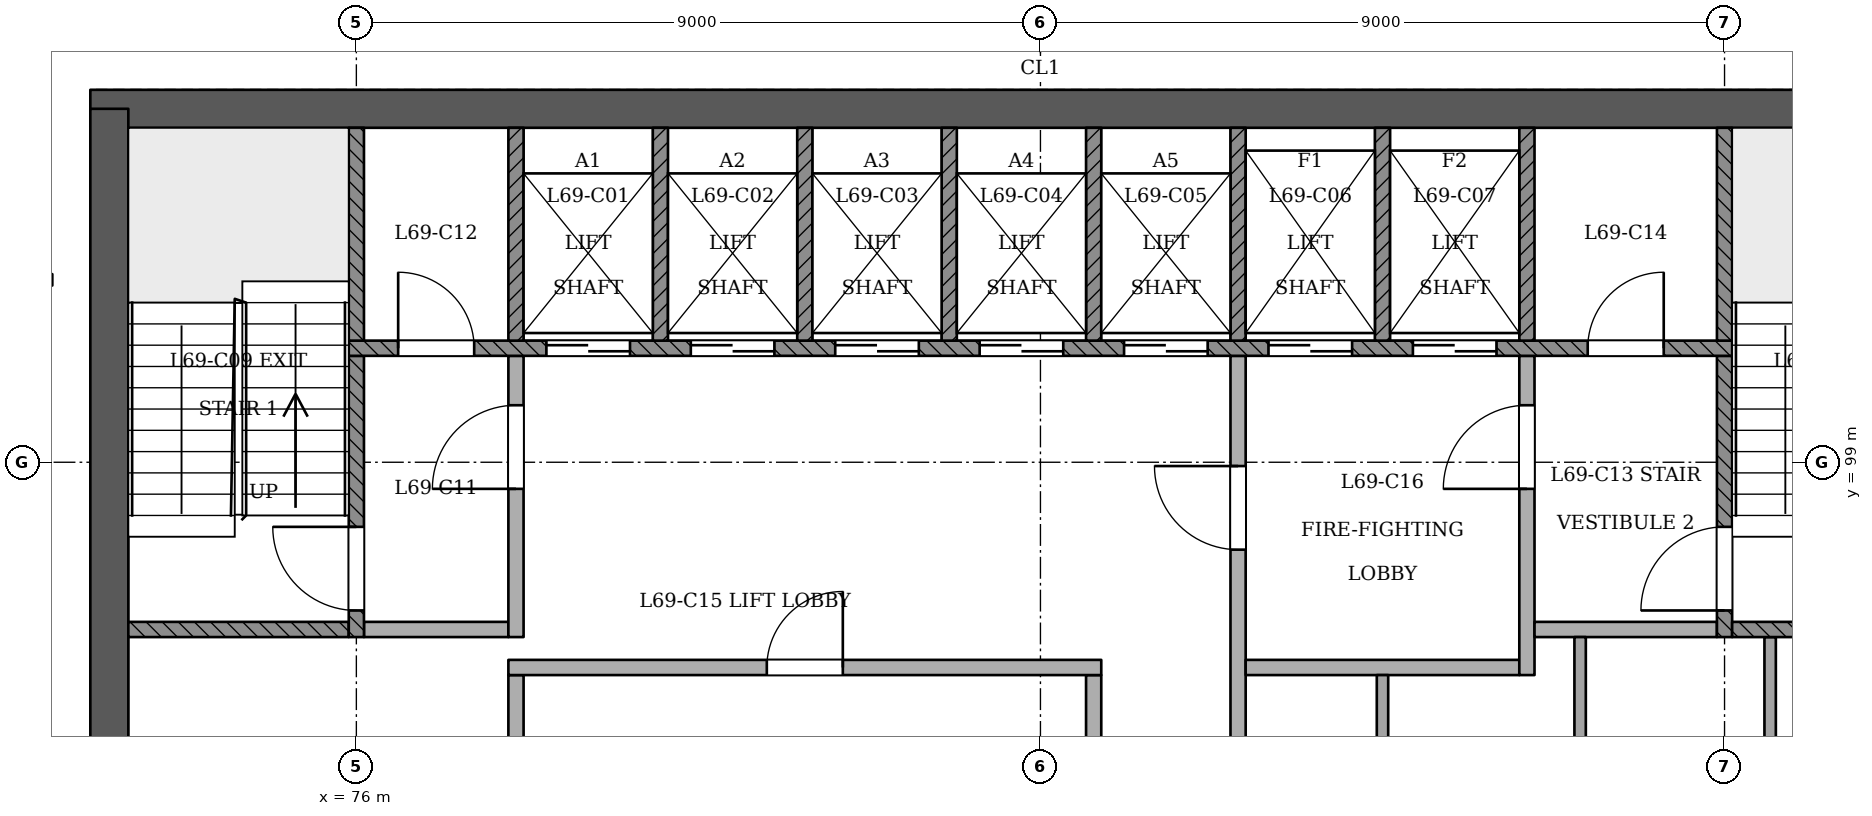
"""IFC4 building model, lengths in metres.
Left out: names, types, materials, properties, quantities, classifications, styles, units other than length and angle.
Written with IfcOpenShell. Run it as: python <this file> out.ifc"""

import sys

from ifc_helpers import new_model, si_unit, direction, frame, frame_2d, origin, place, context, subcontext, project, spatial, rectangle, extrude, element, fill, save


model = new_model("IFC4")
c1 = context("Model", 3, precision=1e-05, world=origin(), true_north=direction((0.0, 1.0)))
c2 = subcontext(c1, "Body", "Model", "MODEL_VIEW")
j1 = project(units=[si_unit("LENGTHUNIT", "METRE"), si_unit("PLANEANGLEUNIT", "RADIAN")], contexts=[c1])
p1 = place(None, origin())
s1 = spatial("IfcSite", under=j1, at=p1, CompositionType="ELEMENT")
p2 = place(p1, origin())
s2 = spatial("IfcBuilding", under=s1, at=p2, CompositionType="ELEMENT")
p3 = place(p2, frame((0.0, 0.0, 268.0)))
s3 = spatial("IfcBuildingStorey", under=s2, at=p3, CompositionType="ELEMENT", Elevation=268.0)
p4 = place(p3, frame((97.25, 103.65, 0.0), z_axis=(0.0, 0.0, 1.0), x_axis=(-1.0, 0.0, 0.0)))
e1 = element("IfcWall", 1, at=p4, inside=s3, PredefinedType="SHEAR", context=c2, shape_type="SweptSolid", body=[
    extrude(rectangle(XDim=24.75, YDim=0.5, at=frame_2d((12.375, 0.0))), origin(), (0.0, 0.0, 1.0), 3.6),
])
p5 = place(p3, frame((72.75, 103.65, 0.0), z_axis=(0.0, 0.0, 1.0), x_axis=(0.0, -1.0, 0.0)))
e2 = element("IfcWall", 2, at=p5, inside=s3, PredefinedType="SHEAR", context=c2, shape_type="SweptSolid", body=[
    extrude(rectangle(XDim=10.75, YDim=0.5, at=frame_2d((5.375, 0.0))), origin(), (0.0, 0.0, 1.0), 3.6),
])
p6 = place(p3, frame((72.0, 101.4, 0.0), z_axis=(0.0, 0.0, 1.0), x_axis=(-1.0, 0.0, 0.0)))
e3 = element("IfcWall", 3, at=p6, inside=s3, PredefinedType="PARTITIONING", context=c2, shape_type="SweptSolid", body=[
    extrude(rectangle(XDim=1.8, YDim=0.15, at=frame_2d((0.9, 0.0))), origin(), (0.0, 0.0, 1.0), 3.2),
])
for number, where, z_axis, x_axis in (
    (4, (78.1, 93.4, 0.0), (0.0, 0.0, 1.0), (0.0, 1.0, 0.0)),
    (5, (85.7, 93.4, 0.0), (0.0, 0.0, 1.0), (0.0, 1.0, 0.0)),
):
    element("IfcWall", number, at=place(p3, frame(where, z_axis=z_axis, x_axis=x_axis)), inside=s3, PredefinedType="PARTITIONING", context=c2, shape_type="SweptSolid", body=[
        extrude(rectangle(XDim=2.8, YDim=0.2, at=frame_2d((1.4, 0.0))), origin(), (0.0, 0.0, 1.0), 3.2),
    ])
p7 = place(p3, frame((87.6, 93.4, 0.0), z_axis=(0.0, 0.0, 1.0), x_axis=(0.0, 1.0, 0.0)))
e6 = element("IfcWall", 6, at=p7, inside=s3, PredefinedType="PARTITIONING", context=c2, shape_type="SweptSolid", body=[
    extrude(rectangle(XDim=7.0, YDim=0.2, at=frame_2d((3.5, 0.0))), origin(), (0.0, 0.0, 1.0), 3.2),
])
p8 = place(p7, frame((4.45, 0.0, 0.0)))
e7 = element("IfcOpeningElement", 7, at=p8, cuts=e6, PredefinedType="OPENING", context=c2, shape_type="SweptSolid", body=[
    extrude(rectangle(XDim=1.1, YDim=2.1, at=frame_2d((0.55, 1.05))), frame((0.0, 0.11, 0.0), z_axis=(0.0, -1.0, 0.0), x_axis=(1.0, 0.0, 0.0)), (0.0, 0.0, 1.0), 0.221),
])
p9 = place(p3, frame((89.5, 93.4, 0.0), z_axis=(0.0, 0.0, 1.0), x_axis=(0.0, 1.0, 0.0)))
e8 = element("IfcWall", 8, at=p9, inside=s3, PredefinedType="PARTITIONING", context=c2, shape_type="SweptSolid", body=[
    extrude(rectangle(XDim=2.8, YDim=0.15, at=frame_2d((1.4, 0.0))), origin(), (0.0, 0.0, 1.0), 3.2),
])
for number, where, z_axis, x_axis in (
    (9, (92.1, 93.4, 0.0), (0.0, 0.0, 1.0), (0.0, 1.0, 0.0)),
    (10, (94.6, 93.4, 0.0), (0.0, 0.0, 1.0), (0.0, 1.0, 0.0)),
):
    element("IfcWall", number, at=place(p3, frame(where, z_axis=z_axis, x_axis=x_axis)), inside=s3, PredefinedType="PARTITIONING", context=c2, shape_type="SweptSolid", body=[
        extrude(rectangle(XDim=3.3, YDim=0.15, at=frame_2d((1.65, 0.0))), origin(), (0.0, 0.0, 1.0), 3.2),
    ])
p10 = place(p3, frame((78.0, 96.3, 0.0), z_axis=(0.0, 0.0, 1.0), x_axis=(1.0, 0.0, 0.0)))
e11 = element("IfcWall", 11, at=p10, inside=s3, PredefinedType="PARTITIONING", context=c2, shape_type="SweptSolid", body=[
    extrude(rectangle(XDim=7.8, YDim=0.2, at=frame_2d((3.9, 0.0))), origin(), (0.0, 0.0, 1.0), 3.2),
])
p11 = place(p10, frame((3.4, 0.0, 0.0)))
e12 = element("IfcOpeningElement", 12, at=p11, cuts=e11, PredefinedType="OPENING", context=c2, shape_type="SweptSolid", body=[
    extrude(rectangle(XDim=1.0, YDim=2.1, at=frame_2d((0.5, 1.05))), frame((0.0, 0.11, 0.0), z_axis=(0.0, -1.0, 0.0), x_axis=(1.0, 0.0, 0.0)), (0.0, 0.0, 1.0), 0.221),
])
p12 = place(p3, frame((87.7, 96.3, 0.0), z_axis=(0.0, 0.0, 1.0), x_axis=(1.0, 0.0, 0.0)))
e13 = element("IfcWall", 13, at=p12, inside=s3, PredefinedType="PARTITIONING", context=c2, shape_type="SweptSolid", body=[
    extrude(rectangle(XDim=3.6, YDim=0.2, at=frame_2d((1.8, 0.0))), origin(), (0.0, 0.0, 1.0), 3.2),
])
p13 = place(p3, frame((91.4, 96.2, 0.0), z_axis=(0.0, 0.0, 1.0), x_axis=(0.0, 1.0, 0.0)))
e14 = element("IfcWall", 14, at=p13, inside=s3, PredefinedType="PARTITIONING", context=c2, shape_type="SweptSolid", body=[
    extrude(rectangle(XDim=4.2, YDim=0.2, at=frame_2d((2.1, 0.0))), origin(), (0.0, 0.0, 1.0), 3.2),
])
p14 = place(p13, frame((2.45, 0.0, 0.0)))
e15 = element("IfcOpeningElement", 15, at=p14, cuts=e14, PredefinedType="OPENING", context=c2, shape_type="SweptSolid", body=[
    extrude(rectangle(XDim=1.1, YDim=2.1, at=frame_2d((0.55, 1.05))), frame((0.0, 0.11, 0.0), z_axis=(0.0, -1.0, 0.0), x_axis=(1.0, 0.0, 0.0)), (0.0, 0.0, 1.0), 0.221),
])
p15 = place(p3, frame((73.0, 96.8, 0.0), z_axis=(0.0, 0.0, 1.0), x_axis=(1.0, 0.0, 0.0)))
e16 = element("IfcWall", 16, at=p15, inside=s3, PredefinedType="SOLIDWALL", context=c2, shape_type="SweptSolid", body=[
    extrude(rectangle(XDim=2.9, YDim=0.2, at=frame_2d((1.45, 0.0))), origin(), (0.0, 0.0, 1.0), 3.2),
])
p16 = place(p3, frame((76.0, 96.7, 0.0), z_axis=(0.0, 0.0, 1.0), x_axis=(0.0, 1.0, 0.0)))
e17 = element("IfcWall", 17, at=p16, inside=s3, PredefinedType="SOLIDWALL", context=c2, shape_type="SweptSolid", body=[
    extrude(rectangle(XDim=3.7, YDim=0.2, at=frame_2d((1.85, 0.0))), origin(), (0.0, 0.0, 1.0), 3.2),
])
p17 = place(p16, frame((0.35, 0.0, 0.0)))
e18 = element("IfcOpeningElement", 18, at=p17, cuts=e17, PredefinedType="OPENING", context=c2, shape_type="SweptSolid", body=[
    extrude(rectangle(XDim=1.1, YDim=2.1, at=frame_2d((0.55, 1.05))), frame((0.0, 0.11, 0.0), z_axis=(0.0, -1.0, 0.0), x_axis=(1.0, 0.0, 0.0)), (0.0, 0.0, 1.0), 0.221),
])
p18 = place(p3, frame((76.1, 96.8, 0.0), z_axis=(0.0, 0.0, 1.0), x_axis=(1.0, 0.0, 0.0)))
e19 = element("IfcWall", 19, at=p18, inside=s3, PredefinedType="PARTITIONING", context=c2, shape_type="SweptSolid", body=[
    extrude(rectangle(XDim=1.9, YDim=0.2, at=frame_2d((0.95, 0.0))), origin(), (0.0, 0.0, 1.0), 3.2),
])
p19 = place(p3, frame((78.1, 96.7, 0.0), z_axis=(0.0, 0.0, 1.0), x_axis=(0.0, 1.0, 0.0)))
e20 = element("IfcWall", 20, at=p19, inside=s3, PredefinedType="PARTITIONING", context=c2, shape_type="SweptSolid", body=[
    extrude(rectangle(XDim=3.7, YDim=0.2, at=frame_2d((1.85, 0.0))), origin(), (0.0, 0.0, 1.0), 3.2),
])
p20 = place(p19, frame((1.95, 0.0, 0.0)))
e21 = element("IfcOpeningElement", 21, at=p20, cuts=e20, PredefinedType="OPENING", context=c2, shape_type="SweptSolid", body=[
    extrude(rectangle(XDim=1.1, YDim=2.1, at=frame_2d((0.55, 1.05))), frame((0.0, 0.11, 0.0), z_axis=(0.0, -1.0, 0.0), x_axis=(1.0, 0.0, 0.0)), (0.0, 0.0, 1.0), 0.221),
])
p21 = place(p3, frame((91.5, 96.8, 0.0), z_axis=(0.0, 0.0, 1.0), x_axis=(1.0, 0.0, 0.0)))
e22 = element("IfcWall", 22, at=p21, inside=s3, PredefinedType="PARTITIONING", context=c2, shape_type="SweptSolid", body=[
    extrude(rectangle(XDim=2.4, YDim=0.2, at=frame_2d((1.2, 0.0))), origin(), (0.0, 0.0, 1.0), 3.2),
])
p22 = place(p3, frame((94.0, 96.7, 0.0), z_axis=(0.0, 0.0, 1.0), x_axis=(0.0, 1.0, 0.0)))
e23 = element("IfcWall", 23, at=p22, inside=s3, PredefinedType="SOLIDWALL", context=c2, shape_type="SweptSolid", body=[
    extrude(rectangle(XDim=3.7, YDim=0.2, at=frame_2d((1.85, 0.0))), origin(), (0.0, 0.0, 1.0), 3.2),
])
p23 = place(p22, frame((0.35, 0.0, 0.0)))
e24 = element("IfcOpeningElement", 24, at=p23, cuts=e23, PredefinedType="OPENING", context=c2, shape_type="SweptSolid", body=[
    extrude(rectangle(XDim=1.1, YDim=2.1, at=frame_2d((0.55, 1.05))), frame((0.0, 0.11, 0.0), z_axis=(0.0, -1.0, 0.0), x_axis=(1.0, 0.0, 0.0)), (0.0, 0.0, 1.0), 0.221),
])
p24 = place(p3, frame((94.1, 96.8, 0.0), z_axis=(0.0, 0.0, 1.0), x_axis=(1.0, 0.0, 0.0)))
e25 = element("IfcWall", 25, at=p24, inside=s3, PredefinedType="SOLIDWALL", context=c2, shape_type="SweptSolid", body=[
    extrude(rectangle(XDim=2.9, YDim=0.2, at=frame_2d((1.45, 0.0))), origin(), (0.0, 0.0, 1.0), 3.2),
])
p25 = place(p3, frame((75.9, 100.5, 0.0), z_axis=(0.0, 0.0, 1.0), x_axis=(1.0, 0.0, 0.0)))
e26 = element("IfcWall", 26, at=p25, inside=s3, PredefinedType="SOLIDWALL", context=c2, shape_type="SweptSolid", body=[
    extrude(rectangle(XDim=18.2, YDim=0.2, at=frame_2d((9.1, 0.0))), origin(), (0.0, 0.0, 1.0), 3.2),
])
p26 = place(p25, frame((2.6, 0.0, 0.0)))
e27 = element("IfcOpeningElement", 27, at=p26, cuts=e26, PredefinedType="OPENING", context=c2, shape_type="SweptSolid", body=[
    extrude(rectangle(XDim=1.1, YDim=2.1, at=frame_2d((0.55, 1.05))), frame((0.0, 0.11, 0.0), z_axis=(0.0, -1.0, 0.0), x_axis=(1.0, 0.0, 0.0)), (0.0, 0.0, 1.0), 0.221),
])
p27 = place(p25, frame((4.5, 0.0, 0.0)))
e28 = element("IfcOpeningElement", 28, at=p27, cuts=e26, PredefinedType="OPENING", context=c2, shape_type="SweptSolid", body=[
    extrude(rectangle(XDim=1.1, YDim=2.1, at=frame_2d((0.55, 1.05))), frame((0.0, 0.11, 0.0), z_axis=(0.0, -1.0, 0.0), x_axis=(1.0, 0.0, 0.0)), (0.0, 0.0, 1.0), 0.221),
])
p28 = place(p25, frame((6.4, 0.0, 0.0)))
e29 = element("IfcOpeningElement", 29, at=p28, cuts=e26, PredefinedType="OPENING", context=c2, shape_type="SweptSolid", body=[
    extrude(rectangle(XDim=1.1, YDim=2.1, at=frame_2d((0.55, 1.05))), frame((0.0, 0.11, 0.0), z_axis=(0.0, -1.0, 0.0), x_axis=(1.0, 0.0, 0.0)), (0.0, 0.0, 1.0), 0.221),
])
p29 = place(p25, frame((8.3, 0.0, 0.0)))
e30 = element("IfcOpeningElement", 30, at=p29, cuts=e26, PredefinedType="OPENING", context=c2, shape_type="SweptSolid", body=[
    extrude(rectangle(XDim=1.1, YDim=2.1, at=frame_2d((0.55, 1.05))), frame((0.0, 0.11, 0.0), z_axis=(0.0, -1.0, 0.0), x_axis=(1.0, 0.0, 0.0)), (0.0, 0.0, 1.0), 0.221),
])
p30 = place(p25, frame((10.2, 0.0, 0.0)))
e31 = element("IfcOpeningElement", 31, at=p30, cuts=e26, PredefinedType="OPENING", context=c2, shape_type="SweptSolid", body=[
    extrude(rectangle(XDim=1.1, YDim=2.1, at=frame_2d((0.55, 1.05))), frame((0.0, 0.11, 0.0), z_axis=(0.0, -1.0, 0.0), x_axis=(1.0, 0.0, 0.0)), (0.0, 0.0, 1.0), 0.221),
])
p31 = place(p25, frame((12.1, 0.0, 0.0)))
e32 = element("IfcOpeningElement", 32, at=p31, cuts=e26, PredefinedType="OPENING", context=c2, shape_type="SweptSolid", body=[
    extrude(rectangle(XDim=1.1, YDim=2.1, at=frame_2d((0.55, 1.05))), frame((0.0, 0.11, 0.0), z_axis=(0.0, -1.0, 0.0), x_axis=(1.0, 0.0, 0.0)), (0.0, 0.0, 1.0), 0.221),
])
p32 = place(p25, frame((14.0, 0.0, 0.0)))
e33 = element("IfcOpeningElement", 33, at=p32, cuts=e26, PredefinedType="OPENING", context=c2, shape_type="SweptSolid", body=[
    extrude(rectangle(XDim=1.1, YDim=2.1, at=frame_2d((0.55, 1.05))), frame((0.0, 0.11, 0.0), z_axis=(0.0, -1.0, 0.0), x_axis=(1.0, 0.0, 0.0)), (0.0, 0.0, 1.0), 0.221),
])
p33 = place(p25, frame((0.65, 0.0, 0.0)))
e34 = element("IfcOpeningElement", 34, at=p33, cuts=e26, PredefinedType="OPENING", context=c2, shape_type="SweptSolid", body=[
    extrude(rectangle(XDim=1.0, YDim=2.1, at=frame_2d((0.5, 1.05))), frame((0.0, 0.11, 0.0), z_axis=(0.0, -1.0, 0.0), x_axis=(1.0, 0.0, 0.0)), (0.0, 0.0, 1.0), 0.221),
])
p34 = place(p25, frame((16.3, 0.0, 0.0)))
e35 = element("IfcOpeningElement", 35, at=p34, cuts=e26, PredefinedType="OPENING", context=c2, shape_type="SweptSolid", body=[
    extrude(rectangle(XDim=1.0, YDim=2.1, at=frame_2d((0.5, 1.05))), frame((0.0, 0.11, 0.0), z_axis=(0.0, -1.0, 0.0), x_axis=(1.0, 0.0, 0.0)), (0.0, 0.0, 1.0), 0.221),
])
for number, where, z_axis, x_axis in (
    (36, (76.0, 100.6, 0.0), (0.0, 0.0, 1.0), (0.0, 1.0, 0.0)),
    (37, (78.1, 100.6, 0.0), (0.0, 0.0, 1.0), (0.0, 1.0, 0.0)),
    (38, (80.0, 100.6, 0.0), (0.0, 0.0, 1.0), (0.0, 1.0, 0.0)),
    (39, (81.9, 100.6, 0.0), (0.0, 0.0, 1.0), (0.0, 1.0, 0.0)),
    (40, (83.8, 100.6, 0.0), (0.0, 0.0, 1.0), (0.0, 1.0, 0.0)),
    (41, (85.7, 100.6, 0.0), (0.0, 0.0, 1.0), (0.0, 1.0, 0.0)),
    (42, (87.6, 100.6, 0.0), (0.0, 0.0, 1.0), (0.0, 1.0, 0.0)),
    (43, (89.5, 100.6, 0.0), (0.0, 0.0, 1.0), (0.0, 1.0, 0.0)),
    (44, (91.4, 100.6, 0.0), (0.0, 0.0, 1.0), (0.0, 1.0, 0.0)),
    (45, (94.0, 100.6, 0.0), (0.0, 0.0, 1.0), (0.0, 1.0, 0.0)),
):
    element("IfcWall", number, at=place(p3, frame(where, z_axis=z_axis, x_axis=x_axis)), inside=s3, PredefinedType="SOLIDWALL", context=c2, shape_type="SweptSolid", body=[
        extrude(rectangle(XDim=2.8, YDim=0.2, at=frame_2d((1.4, 0.0))), origin(), (0.0, 0.0, 1.0), 3.2),
    ])
p35 = place(p26, origin())
e46 = element("IfcDoor", 46, at=p35, inside=s3, OperationType="SLIDING_TO_RIGHT", PredefinedType="NOTDEFINED", context=c2, shape_type="SweptSolid", body=[
    extrude(rectangle(XDim=1.1, YDim=2.1, at=frame_2d((0.55, 1.05))), frame((0.0, 0.025, 0.0), z_axis=(0.0, -1.0, 0.0), x_axis=(1.0, 0.0, 0.0)), (0.0, 0.0, 1.0), 0.05),
])
fill(e27, e46)
p36 = place(p27, origin())
e47 = element("IfcDoor", 47, at=p36, inside=s3, OperationType="SLIDING_TO_LEFT", PredefinedType="NOTDEFINED", context=c2, shape_type="SweptSolid", body=[
    extrude(rectangle(XDim=1.1, YDim=2.1, at=frame_2d((0.55, 1.05))), frame((0.0, 0.025, 0.0), z_axis=(0.0, -1.0, 0.0), x_axis=(1.0, 0.0, 0.0)), (0.0, 0.0, 1.0), 0.05),
])
fill(e28, e47)
p37 = place(p28, origin())
e48 = element("IfcDoor", 48, at=p37, inside=s3, OperationType="SLIDING_TO_RIGHT", PredefinedType="NOTDEFINED", context=c2, shape_type="SweptSolid", body=[
    extrude(rectangle(XDim=1.1, YDim=2.1, at=frame_2d((0.55, 1.05))), frame((0.0, 0.025, 0.0), z_axis=(0.0, -1.0, 0.0), x_axis=(1.0, 0.0, 0.0)), (0.0, 0.0, 1.0), 0.05),
])
fill(e29, e48)
p38 = place(p29, origin())
e49 = element("IfcDoor", 49, at=p38, inside=s3, OperationType="SLIDING_TO_LEFT", PredefinedType="NOTDEFINED", context=c2, shape_type="SweptSolid", body=[
    extrude(rectangle(XDim=1.1, YDim=2.1, at=frame_2d((0.55, 1.05))), frame((0.0, 0.025, 0.0), z_axis=(0.0, -1.0, 0.0), x_axis=(1.0, 0.0, 0.0)), (0.0, 0.0, 1.0), 0.05),
])
fill(e30, e49)
p39 = place(p30, origin())
e50 = element("IfcDoor", 50, at=p39, inside=s3, OperationType="SLIDING_TO_RIGHT", PredefinedType="NOTDEFINED", context=c2, shape_type="SweptSolid", body=[
    extrude(rectangle(XDim=1.1, YDim=2.1, at=frame_2d((0.55, 1.05))), frame((0.0, 0.025, 0.0), z_axis=(0.0, -1.0, 0.0), x_axis=(1.0, 0.0, 0.0)), (0.0, 0.0, 1.0), 0.05),
])
fill(e31, e50)
p40 = place(p31, origin())
e51 = element("IfcDoor", 51, at=p40, inside=s3, OperationType="SLIDING_TO_RIGHT", PredefinedType="NOTDEFINED", context=c2, shape_type="SweptSolid", body=[
    extrude(rectangle(XDim=1.1, YDim=2.1, at=frame_2d((0.55, 1.05))), frame((0.0, 0.025, 0.0), z_axis=(0.0, -1.0, 0.0), x_axis=(1.0, 0.0, 0.0)), (0.0, 0.0, 1.0), 0.05),
])
fill(e32, e51)
p41 = place(p32, origin())
e52 = element("IfcDoor", 52, at=p41, inside=s3, OperationType="SLIDING_TO_LEFT", PredefinedType="NOTDEFINED", context=c2, shape_type="SweptSolid", body=[
    extrude(rectangle(XDim=1.1, YDim=2.1, at=frame_2d((0.55, 1.05))), frame((0.0, 0.025, 0.0), z_axis=(0.0, -1.0, 0.0), x_axis=(1.0, 0.0, 0.0)), (0.0, 0.0, 1.0), 0.05),
])
fill(e33, e52)
p42 = place(p17, origin())
e53 = element("IfcDoor", 53, at=p42, inside=s3, OperationType="SINGLE_SWING_RIGHT", PredefinedType="NOTDEFINED", context=c2, shape_type="SweptSolid", body=[
    extrude(rectangle(XDim=1.1, YDim=2.1, at=frame_2d((0.55, 1.05))), frame((0.0, 0.025, 0.0), z_axis=(0.0, -1.0, 0.0), x_axis=(1.0, 0.0, 0.0)), (0.0, 0.0, 1.0), 0.05),
])
fill(e18, e53)
p43 = place(p23, origin())
e54 = element("IfcDoor", 54, at=p43, inside=s3, OperationType="SINGLE_SWING_LEFT", PredefinedType="NOTDEFINED", context=c2, shape_type="SweptSolid", body=[
    extrude(rectangle(XDim=1.1, YDim=2.1, at=frame_2d((0.55, 1.05))), frame((0.0, 0.025, 0.0), z_axis=(0.0, -1.0, 0.0), x_axis=(1.0, 0.0, 0.0)), (0.0, 0.0, 1.0), 0.05),
])
fill(e24, e54)
p44 = place(p20, origin())
e55 = element("IfcDoor", 55, at=p44, inside=s3, OperationType="SINGLE_SWING_LEFT", PredefinedType="NOTDEFINED", context=c2, shape_type="SweptSolid", body=[
    extrude(rectangle(XDim=1.1, YDim=2.1, at=frame_2d((0.55, 1.05))), frame((0.0, 0.025, 0.0), z_axis=(0.0, -1.0, 0.0), x_axis=(1.0, 0.0, 0.0)), (0.0, 0.0, 1.0), 0.05),
])
fill(e21, e55)
p45 = place(p8, origin())
e56 = element("IfcDoor", 56, at=p45, inside=s3, OperationType="SINGLE_SWING_RIGHT", PredefinedType="NOTDEFINED", context=c2, shape_type="SweptSolid", body=[
    extrude(rectangle(XDim=1.1, YDim=2.1, at=frame_2d((0.55, 1.05))), frame((0.0, 0.025, 0.0), z_axis=(0.0, -1.0, 0.0), x_axis=(1.0, 0.0, 0.0)), (0.0, 0.0, 1.0), 0.05),
])
fill(e7, e56)
p46 = place(p14, origin())
e57 = element("IfcDoor", 57, at=p46, inside=s3, OperationType="SINGLE_SWING_LEFT", PredefinedType="NOTDEFINED", context=c2, shape_type="SweptSolid", body=[
    extrude(rectangle(XDim=1.1, YDim=2.1, at=frame_2d((0.55, 1.05))), frame((0.0, 0.025, 0.0), z_axis=(0.0, -1.0, 0.0), x_axis=(1.0, 0.0, 0.0)), (0.0, 0.0, 1.0), 0.05),
])
fill(e15, e57)
p47 = place(p33, origin())
e58 = element("IfcDoor", 58, at=p47, inside=s3, OperationType="SINGLE_SWING_LEFT", PredefinedType="NOTDEFINED", context=c2, shape_type="SweptSolid", body=[
    extrude(rectangle(XDim=1.0, YDim=2.1, at=frame_2d((0.5, 1.05))), frame((0.0, 0.025, 0.0), z_axis=(0.0, -1.0, 0.0), x_axis=(1.0, 0.0, 0.0)), (0.0, 0.0, 1.0), 0.05),
])
fill(e34, e58)
p48 = place(p34, origin())
e59 = element("IfcDoor", 59, at=p48, inside=s3, OperationType="SINGLE_SWING_RIGHT", PredefinedType="NOTDEFINED", context=c2, shape_type="SweptSolid", body=[
    extrude(rectangle(XDim=1.0, YDim=2.1, at=frame_2d((0.5, 1.05))), frame((0.0, 0.025, 0.0), z_axis=(0.0, -1.0, 0.0), x_axis=(1.0, 0.0, 0.0)), (0.0, 0.0, 1.0), 0.05),
])
fill(e35, e59)
p49 = place(p11, origin())
e60 = element("IfcDoor", 60, at=p49, inside=s3, OperationType="SINGLE_SWING_RIGHT", PredefinedType="NOTDEFINED", context=c2, shape_type="SweptSolid", body=[
    extrude(rectangle(XDim=1.0, YDim=2.1, at=frame_2d((0.5, 1.05))), frame((0.0, 0.025, 0.0), z_axis=(0.0, -1.0, 0.0), x_axis=(1.0, 0.0, 0.0)), (0.0, 0.0, 1.0), 0.05),
])
fill(e12, e60)
save(model, sys.argv[1])
